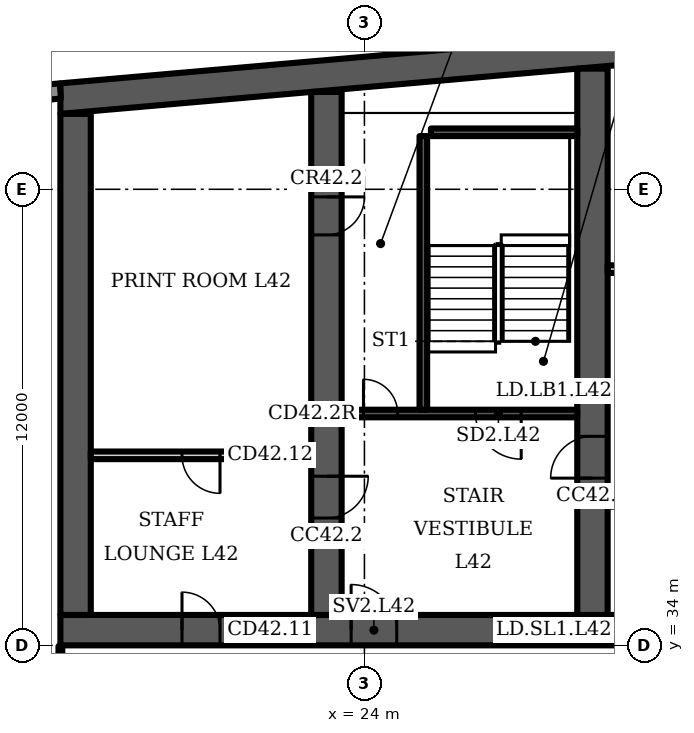
"""IFC4 building model, lengths in metres.
Left out: names, types, materials, properties, quantities, classifications, styles, units other than length and angle.
Written with IfcOpenShell. Run it as: python <this file> out.ifc"""

import sys

from ifc_helpers import new_model, si_unit, direction, frame, frame_2d, origin, place, context, subcontext, project, spatial, polyline, rectangle, outline, extrude, element, fill, save


model = new_model("IFC4")
c1 = context("Model", 3, precision=1e-05, world=origin(), true_north=direction((0.0, 1.0)))
c2 = subcontext(c1, "Body", "Model", "MODEL_VIEW")
j1 = project(units=[si_unit("LENGTHUNIT", "METRE"), si_unit("PLANEANGLEUNIT", "RADIAN")], contexts=[c1])
p1 = place(None, origin())
s1 = spatial("IfcSite", under=j1, at=p1, CompositionType="ELEMENT")
p2 = place(p1, origin())
s2 = spatial("IfcBuilding", under=s1, at=p2, CompositionType="ELEMENT")
p3 = place(p2, frame((0.0, 0.0, 173.5)))
s3 = spatial("IfcBuildingStorey", under=s2, at=p3, CompositionType="ELEMENT", Elevation=173.5)
p4 = place(p3, origin())
e1 = element("IfcWall", 1, at=p4, inside=s3, PredefinedType="SHEAR", context=c2, shape_type="SweptSolid", body=[
    extrude(outline(polyline([(16.0, 47.984), (37.0, 49.822), (58.0, 47.984), (58.0, 48.787), (37.0, 50.625), (16.0, 48.787), (16.0, 47.984)])), origin(), (0.0, 0.0, 1.0), 3.6),
])
p5 = place(p3, frame((16.0, 34.4, 0.0), z_axis=(0.0, 0.0, 1.0), x_axis=(1.0, 0.0, 0.0)))
e2 = element("IfcWall", 2, at=p5, inside=s3, PredefinedType="SHEAR", context=c2, shape_type="SweptSolid", body=[
    extrude(rectangle(XDim=42.0, YDim=0.8, at=frame_2d((21.0, 0.0))), origin(), (0.0, 0.0, 1.0), 3.6),
])
p6 = place(p5, frame((3.2, 0.0, 0.0)))
e3 = element("IfcOpeningElement", 3, at=p6, cuts=e2, PredefinedType="OPENING", context=c2, shape_type="SweptSolid", body=[
    extrude(rectangle(XDim=1.0, YDim=2.1, at=frame_2d((0.5, 1.05))), frame((0.0, 0.41, 0.0), z_axis=(0.0, -1.0, 0.0), x_axis=(1.0, 0.0, 0.0)), (0.0, 0.0, 1.0), 0.82),
])
p7 = place(p5, frame((7.65, 0.0, 0.0)))
e4 = element("IfcOpeningElement", 4, at=p7, cuts=e2, PredefinedType="OPENING", context=c2, shape_type="SweptSolid", body=[
    extrude(rectangle(XDim=1.2, YDim=2.1, at=frame_2d((0.6, 1.05))), frame((0.0, 0.41, 0.0), z_axis=(0.0, -1.0, 0.0), x_axis=(1.0, 0.0, 0.0)), (0.0, 0.0, 1.0), 0.82),
])
p8 = place(p5, frame((14.767, 0.0, 0.0)))
e5 = element("IfcOpeningElement", 5, at=p8, cuts=e2, PredefinedType="OPENING", context=c2, shape_type="SweptSolid", body=[
    extrude(rectangle(XDim=1.1, YDim=2.1, at=frame_2d((0.55, 1.05))), frame((0.0, 0.41, 0.0), z_axis=(0.0, -1.0, 0.0), x_axis=(1.0, 0.0, 0.0)), (0.0, 0.0, 1.0), 0.82),
])
p9 = place(p5, frame((19.133, 0.0, 0.0)))
e6 = element("IfcOpeningElement", 6, at=p9, cuts=e2, PredefinedType="OPENING", context=c2, shape_type="SweptSolid", body=[
    extrude(rectangle(XDim=1.1, YDim=2.1, at=frame_2d((0.55, 1.05))), frame((0.0, 0.41, 0.0), z_axis=(0.0, -1.0, 0.0), x_axis=(1.0, 0.0, 0.0)), (0.0, 0.0, 1.0), 0.82),
])
p10 = place(p5, frame((16.8, 0.0, 0.0)))
e7 = element("IfcOpeningElement", 7, at=p10, cuts=e2, PredefinedType="OPENING", context=c2, shape_type="SweptSolid", body=[
    extrude(rectangle(XDim=1.4, YDim=2.1, at=frame_2d((0.7, 1.05))), frame((0.0, 0.41, 0.0), z_axis=(0.0, -1.0, 0.0), x_axis=(1.0, 0.0, 0.0)), (0.0, 0.0, 1.0), 0.82),
])
p11 = place(p5, frame((21.767, 0.0, 0.0)))
e8 = element("IfcOpeningElement", 8, at=p11, cuts=e2, PredefinedType="OPENING", context=c2, shape_type="SweptSolid", body=[
    extrude(rectangle(XDim=1.1, YDim=2.1, at=frame_2d((0.55, 1.05))), frame((0.0, 0.41, 0.0), z_axis=(0.0, -1.0, 0.0), x_axis=(1.0, 0.0, 0.0)), (0.0, 0.0, 1.0), 0.82),
])
p12 = place(p5, frame((23.95, 0.0, 0.0)))
e9 = element("IfcOpeningElement", 9, at=p12, cuts=e2, PredefinedType="OPENING", context=c2, shape_type="SweptSolid", body=[
    extrude(rectangle(XDim=1.1, YDim=2.1, at=frame_2d((0.55, 1.05))), frame((0.0, 0.41, 0.0), z_axis=(0.0, -1.0, 0.0), x_axis=(1.0, 0.0, 0.0)), (0.0, 0.0, 1.0), 0.82),
])
p13 = place(p5, frame((26.133, 0.0, 0.0)))
e10 = element("IfcOpeningElement", 10, at=p13, cuts=e2, PredefinedType="OPENING", context=c2, shape_type="SweptSolid", body=[
    extrude(rectangle(XDim=1.1, YDim=2.1, at=frame_2d((0.55, 1.05))), frame((0.0, 0.41, 0.0), z_axis=(0.0, -1.0, 0.0), x_axis=(1.0, 0.0, 0.0)), (0.0, 0.0, 1.0), 0.82),
])
p14 = place(p5, frame((33.15, 0.0, 0.0)))
e11 = element("IfcOpeningElement", 11, at=p14, cuts=e2, PredefinedType="OPENING", context=c2, shape_type="SweptSolid", body=[
    extrude(rectangle(XDim=1.2, YDim=2.1, at=frame_2d((0.6, 1.05))), frame((0.0, 0.41, 0.0), z_axis=(0.0, -1.0, 0.0), x_axis=(1.0, 0.0, 0.0)), (0.0, 0.0, 1.0), 0.82),
])
p15 = place(p5, frame((35.817, 0.0, 0.0)))
e12 = element("IfcOpeningElement", 12, at=p15, cuts=e2, PredefinedType="OPENING", context=c2, shape_type="SweptSolid", body=[
    extrude(rectangle(XDim=1.0, YDim=2.1, at=frame_2d((0.5, 1.05))), frame((0.0, 0.41, 0.0), z_axis=(0.0, -1.0, 0.0), x_axis=(1.0, 0.0, 0.0)), (0.0, 0.0, 1.0), 0.82),
])
p16 = place(p5, frame((39.95, 0.0, 0.0)))
e13 = element("IfcOpeningElement", 13, at=p16, cuts=e2, PredefinedType="OPENING", context=c2, shape_type="SweptSolid", body=[
    extrude(rectangle(XDim=1.0, YDim=2.1, at=frame_2d((0.5, 1.05))), frame((0.0, 0.41, 0.0), z_axis=(0.0, -1.0, 0.0), x_axis=(1.0, 0.0, 0.0)), (0.0, 0.0, 1.0), 0.82),
])
p17 = place(p5, frame((37.767, 0.0, 0.0)))
e14 = element("IfcOpeningElement", 14, at=p17, cuts=e2, PredefinedType="OPENING", context=c2, shape_type="SweptSolid", body=[
    extrude(rectangle(XDim=1.4, YDim=2.1, at=frame_2d((0.7, 1.05))), frame((0.0, 0.41, 0.0), z_axis=(0.0, -1.0, 0.0), x_axis=(1.0, 0.0, 0.0)), (0.0, 0.0, 1.0), 0.82),
])
p18 = place(p3, frame((16.4, 34.8, 0.0), z_axis=(0.0, 0.0, 1.0), x_axis=(0.0, 1.0, 0.0)))
e15 = element("IfcWall", 15, at=p18, inside=s3, PredefinedType="SHEAR", context=c2, shape_type="SweptSolid", body=[
    extrude(rectangle(XDim=13.184, YDim=0.8, at=frame_2d((6.592, 0.0))), origin(), (0.0, 0.0, 1.0), 3.6),
])
p19 = place(p3, frame((23.0, 34.8, 0.0), z_axis=(0.0, 0.0, 1.0), x_axis=(0.0, 1.0, 0.0)))
e16 = element("IfcWall", 16, at=p19, inside=s3, PredefinedType="SHEAR", context=c2, shape_type="SweptSolid", body=[
    extrude(rectangle(XDim=13.762, YDim=0.8, at=frame_2d((6.881, 0.0))), origin(), (0.0, 0.0, 1.0), 3.6),
])
p20 = place(p19, frame((2.55, 0.0, 0.0)))
e17 = element("IfcOpeningElement", 17, at=p20, cuts=e16, PredefinedType="OPENING", context=c2, shape_type="SweptSolid", body=[
    extrude(rectangle(XDim=1.1, YDim=2.1, at=frame_2d((0.55, 1.05))), frame((0.0, 0.41, 0.0), z_axis=(0.0, -1.0, 0.0), x_axis=(1.0, 0.0, 0.0)), (0.0, 0.0, 1.0), 0.82),
])
p21 = place(p19, frame((10.0, 0.0, 0.0)))
e18 = element("IfcOpeningElement", 18, at=p21, cuts=e16, PredefinedType="OPENING", context=c2, shape_type="SweptSolid", body=[
    extrude(rectangle(XDim=1.0, YDim=2.1, at=frame_2d((0.5, 1.05))), frame((0.0, 0.41, 0.0), z_axis=(0.0, -1.0, 0.0), x_axis=(1.0, 0.0, 0.0)), (0.0, 0.0, 1.0), 0.82),
])
p22 = place(p3, frame((30.0, 34.8, 0.0), z_axis=(0.0, 0.0, 1.0), x_axis=(0.0, 1.0, 0.0)))
e19 = element("IfcWall", 19, at=p22, inside=s3, PredefinedType="SHEAR", context=c2, shape_type="SweptSolid", body=[
    extrude(rectangle(XDim=14.374, YDim=0.8, at=frame_2d((7.187, 0.0))), origin(), (0.0, 0.0, 1.0), 3.6),
])
p23 = place(p22, frame((3.6, 0.0, 0.0)))
e20 = element("IfcOpeningElement", 20, at=p23, cuts=e19, PredefinedType="OPENING", context=c2, shape_type="SweptSolid", body=[
    extrude(rectangle(XDim=1.1, YDim=2.1, at=frame_2d((0.55, 1.05))), frame((0.0, 0.41, 0.0), z_axis=(0.0, -1.0, 0.0), x_axis=(1.0, 0.0, 0.0)), (0.0, 0.0, 1.0), 0.82),
])
p24 = place(p3, frame((16.0, 48.587, 0.0), z_axis=(0.0, 0.0, 1.0), x_axis=(-0.996194, -0.087168, 0.0)))
e21 = element("IfcWall", 21, at=p24, inside=s3, PredefinedType="SOLIDWALL", context=c2, shape_type="SweptSolid", body=[
    extrude(rectangle(XDim=2.994, YDim=0.4, at=frame_2d((1.497, 0.0))), origin(), (0.0, 0.0, 1.0), 3.2),
])
p25 = place(p3, frame((16.8, 39.0, 0.0), z_axis=(0.0, 0.0, 1.0), x_axis=(1.0, 0.0, 0.0)))
e22 = element("IfcWall", 22, at=p25, inside=s3, PredefinedType="PARTITIONING", context=c2, shape_type="SweptSolid", body=[
    extrude(rectangle(XDim=5.8, YDim=0.2, at=frame_2d((2.9, 0.0))), origin(), (0.0, 0.0, 1.0), 3.2),
])
p26 = place(p25, frame((2.4, 0.0, 0.0)))
e23 = element("IfcOpeningElement", 23, at=p26, cuts=e22, PredefinedType="OPENING", context=c2, shape_type="SweptSolid", body=[
    extrude(rectangle(XDim=1.0, YDim=2.1, at=frame_2d((0.5, 1.05))), frame((0.0, 0.11, 0.0), z_axis=(0.0, -1.0, 0.0), x_axis=(1.0, 0.0, 0.0)), (0.0, 0.0, 1.0), 0.22),
])
p27 = place(p3, frame((23.4, 40.1, 0.0), z_axis=(0.0, 0.0, 1.0), x_axis=(1.0, 0.0, 0.0)))
e24 = element("IfcWall", 24, at=p27, inside=s3, PredefinedType="SHEAR", context=c2, shape_type="SweptSolid", body=[
    extrude(rectangle(XDim=6.2, YDim=0.2, at=frame_2d((3.1, 0.0))), origin(), (0.0, 0.0, 1.0), 3.2),
])
p28 = place(p27, frame((3.525, 0.0, 0.0)))
e25 = element("IfcOpeningElement", 25, at=p28, cuts=e24, PredefinedType="OPENING", context=c2, shape_type="SweptSolid", body=[
    extrude(rectangle(XDim=1.2, YDim=2.1, at=frame_2d((0.6, 1.05))), frame((0.0, 0.11, 0.0), z_axis=(0.0, -1.0, 0.0), x_axis=(1.0, 0.0, 0.0)), (0.0, 0.0, 1.0), 0.22),
])
p29 = place(p27, frame((0.575, 0.0, 0.0)))
e26 = element("IfcOpeningElement", 26, at=p29, cuts=e24, PredefinedType="OPENING", context=c2, shape_type="SweptSolid", body=[
    extrude(rectangle(XDim=0.9, YDim=2.1, at=frame_2d((0.45, 1.05))), frame((0.0, 0.11, 0.0), z_axis=(0.0, -1.0, 0.0), x_axis=(1.0, 0.0, 0.0)), (0.0, 0.0, 1.0), 0.22),
])
p30 = place(p3, frame((25.55, 40.2, 0.0), z_axis=(0.0, 0.0, 1.0), x_axis=(0.0, 1.0, 0.0)))
e27 = element("IfcWall", 27, at=p30, inside=s3, PredefinedType="SHEAR", context=c2, shape_type="SweptSolid", body=[
    extrude(rectangle(XDim=7.2, YDim=0.2, at=frame_2d((3.6, 0.0))), origin(), (0.0, 0.0, 1.0), 3.2),
])
p31 = place(p3, frame((25.75, 47.5, 0.0), z_axis=(0.0, 0.0, 1.0), x_axis=(1.0, 0.0, 0.0)))
e28 = element("IfcWall", 28, at=p31, inside=s3, PredefinedType="SHEAR", context=c2, shape_type="SweptSolid", body=[
    extrude(rectangle(XDim=3.85, YDim=0.2, at=frame_2d((1.925, 0.0))), origin(), (0.0, 0.0, 1.0), 3.2),
])
p32 = place(p3, frame((30.4, 40.7, 0.0), z_axis=(0.0, 0.0, 1.0), x_axis=(1.0, 0.0, 0.0)))
e29 = element("IfcWall", 29, at=p32, inside=s3, PredefinedType="PARTITIONING", context=c2, shape_type="SweptSolid", body=[
    extrude(rectangle(XDim=6.2, YDim=0.2, at=frame_2d((3.1, 0.0))), origin(), (0.0, 0.0, 1.0), 3.2),
])
p33 = place(p32, frame((0.367, 0.0, 0.0)))
e30 = element("IfcOpeningElement", 30, at=p33, cuts=e29, PredefinedType="OPENING", context=c2, shape_type="SweptSolid", body=[
    extrude(rectangle(XDim=1.1, YDim=2.1, at=frame_2d((0.55, 1.05))), frame((0.0, 0.11, 0.0), z_axis=(0.0, -1.0, 0.0), x_axis=(1.0, 0.0, 0.0)), (0.0, 0.0, 1.0), 0.22),
])
p34 = place(p32, frame((2.55, 0.0, 0.0)))
e31 = element("IfcOpeningElement", 31, at=p34, cuts=e29, PredefinedType="OPENING", context=c2, shape_type="SweptSolid", body=[
    extrude(rectangle(XDim=1.1, YDim=2.1, at=frame_2d((0.55, 1.05))), frame((0.0, 0.11, 0.0), z_axis=(0.0, -1.0, 0.0), x_axis=(1.0, 0.0, 0.0)), (0.0, 0.0, 1.0), 0.22),
])
p35 = place(p32, frame((4.733, 0.0, 0.0)))
e32 = element("IfcOpeningElement", 32, at=p35, cuts=e29, PredefinedType="OPENING", context=c2, shape_type="SweptSolid", body=[
    extrude(rectangle(XDim=1.1, YDim=2.1, at=frame_2d((0.55, 1.05))), frame((0.0, 0.11, 0.0), z_axis=(0.0, -1.0, 0.0), x_axis=(1.0, 0.0, 0.0)), (0.0, 0.0, 1.0), 0.22),
])
p36 = place(p3, frame((0.0, 0.0, -0.0)))
e33 = element("IfcWall", 33, at=p36, inside=s3, PredefinedType="PARTITIONING", context=c2, shape_type="SweptSolid", body=[
    extrude(outline(polyline([(32.233, 37.65), (30.4, 37.65), (30.4, 37.85), (32.233, 37.85), (32.433, 37.85), (32.433, 34.8), (32.233, 34.8), (32.233, 37.65)])), origin(), (0.0, 0.0, 1.0), 3.2),
])
p37 = place(p3, frame((0.0, 0.0, -0.0)))
e34 = element("IfcWall", 34, at=p37, inside=s3, PredefinedType="PARTITIONING", context=c2, shape_type="SweptSolid", body=[
    extrude(outline(polyline([(32.433, 40.8), (32.233, 40.8), (32.233, 43.8), (30.4, 43.8), (30.4, 44.0), (36.6, 44.0), (36.6, 43.8), (34.767, 43.8), (34.767, 40.8), (34.567, 40.8), (34.567, 43.8), (32.433, 43.8), (32.433, 40.8)])), origin(), (0.0, 0.0, 1.0), 3.2),
])
p38 = place(p3, frame((16.0, 26.42, 0.0), z_axis=(0.0, 0.0, 1.0), x_axis=(0.0, 1.0, 0.0)))
e35 = element("IfcWall", 35, at=p38, inside=s3, PredefinedType="PARTITIONING", context=c2, shape_type="SweptSolid", body=[
    extrude(rectangle(XDim=7.56, YDim=0.1, at=frame_2d((3.78, 0.0))), origin(), (0.0, 0.0, 1.0), 3.2),
])
p39 = place(p38, frame((1.48, 0.0, 0.0)))
e36 = element("IfcOpeningElement", 36, at=p39, cuts=e35, PredefinedType="OPENING", context=c2, shape_type="SweptSolid", body=[
    extrude(rectangle(XDim=1.8, YDim=2.1, at=frame_2d((0.9, 1.05))), frame((0.0, 0.06, 0.0), z_axis=(0.0, -1.0, 0.0), x_axis=(1.0, 0.0, 0.0)), (0.0, 0.0, 1.0), 0.12),
])
p40 = place(p6, origin())
e37 = element("IfcDoor", 37, at=p40, inside=s3, OperationType="SINGLE_SWING_LEFT", PredefinedType="DOOR", context=c2, shape_type="SweptSolid", body=[
    extrude(rectangle(XDim=1.0, YDim=2.1, at=frame_2d((0.5, 1.05))), frame((0.0, 0.4, 0.0), z_axis=(0.0, -1.0, 0.0), x_axis=(1.0, 0.0, 0.0)), (0.0, 0.0, 1.0), 0.8),
])
fill(e3, e37)
p41 = place(p26, origin())
e38 = element("IfcDoor", 38, at=p41, inside=s3, OperationType="SINGLE_SWING_RIGHT", PredefinedType="DOOR", context=c2, shape_type="SweptSolid", body=[
    extrude(rectangle(XDim=1.0, YDim=2.1, at=frame_2d((0.5, 1.05))), frame((0.0, 0.025, 0.0), z_axis=(0.0, -1.0, 0.0), x_axis=(1.0, 0.0, 0.0)), (0.0, 0.0, 1.0), 0.05),
])
fill(e23, e38)
p42 = place(p28, origin())
e39 = element("IfcDoor", 39, at=p42, inside=s3, OperationType="SINGLE_SWING_RIGHT", PredefinedType="DOOR", context=c2, shape_type="SweptSolid", body=[
    extrude(rectangle(XDim=1.2, YDim=2.1, at=frame_2d((0.6, 1.05))), frame((0.0, 0.025, 0.0), z_axis=(0.0, -1.0, 0.0), x_axis=(1.0, 0.0, 0.0)), (0.0, 0.0, 1.0), 0.05),
])
fill(e25, e39)
p43 = place(p29, origin())
e40 = element("IfcDoor", 40, at=p43, inside=s3, OperationType="SINGLE_SWING_LEFT", PredefinedType="DOOR", context=c2, shape_type="SweptSolid", body=[
    extrude(rectangle(XDim=0.9, YDim=2.1, at=frame_2d((0.45, 1.05))), frame((0.0, 0.025, 0.0), z_axis=(0.0, -1.0, 0.0), x_axis=(1.0, 0.0, 0.0)), (0.0, 0.0, 1.0), 0.05),
])
fill(e26, e40)
p44 = place(p7, origin())
e41 = element("IfcDoor", 41, at=p44, inside=s3, OperationType="SINGLE_SWING_LEFT", PredefinedType="DOOR", context=c2, shape_type="SweptSolid", body=[
    extrude(rectangle(XDim=1.2, YDim=2.1, at=frame_2d((0.6, 1.05))), frame((0.0, 0.025, 0.0), z_axis=(0.0, -1.0, 0.0), x_axis=(1.0, 0.0, 0.0)), (0.0, 0.0, 1.0), 0.05),
])
fill(e4, e41)
p45 = place(p20, origin())
e42 = element("IfcDoor", 42, at=p45, inside=s3, OperationType="SINGLE_SWING_RIGHT", PredefinedType="DOOR", context=c2, shape_type="SweptSolid", body=[
    extrude(rectangle(XDim=1.1, YDim=2.1, at=frame_2d((0.55, 1.05))), frame((0.0, 0.025, 0.0), z_axis=(0.0, -1.0, 0.0), x_axis=(1.0, 0.0, 0.0)), (0.0, 0.0, 1.0), 0.05),
])
fill(e17, e42)
p46 = place(p21, origin())
e43 = element("IfcDoor", 43, at=p46, inside=s3, OperationType="SINGLE_SWING_RIGHT", PredefinedType="DOOR", context=c2, shape_type="SweptSolid", body=[
    extrude(rectangle(XDim=1.0, YDim=2.1, at=frame_2d((0.5, 1.05))), frame((0.0, 0.4, 0.0), z_axis=(0.0, -1.0, 0.0), x_axis=(1.0, 0.0, 0.0)), (0.0, 0.0, 1.0), 0.8),
])
fill(e18, e43)
p47 = place(p23, origin())
e44 = element("IfcDoor", 44, at=p47, inside=s3, OperationType="SINGLE_SWING_LEFT", PredefinedType="DOOR", context=c2, shape_type="SweptSolid", body=[
    extrude(rectangle(XDim=1.1, YDim=2.1, at=frame_2d((0.55, 1.05))), frame((0.0, 0.025, 0.0), z_axis=(0.0, -1.0, 0.0), x_axis=(1.0, 0.0, 0.0)), (0.0, 0.0, 1.0), 0.05),
])
fill(e20, e44)
save(model, sys.argv[1])
